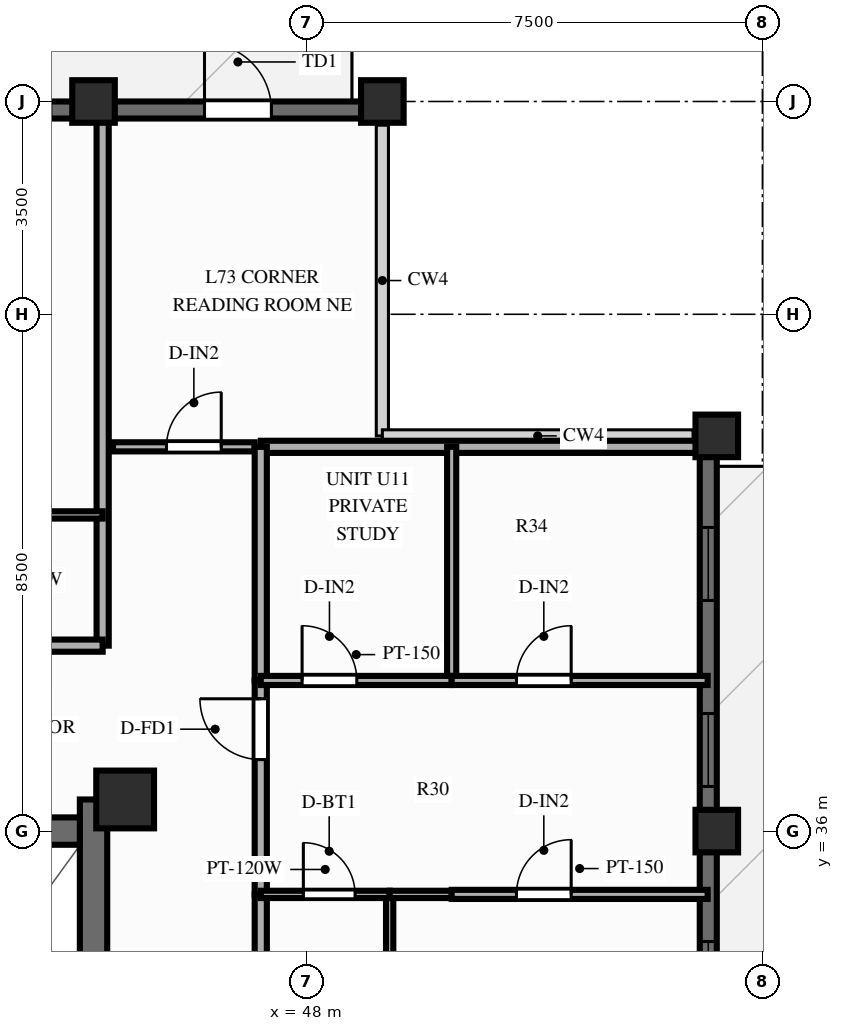
"""IFC4 building model, lengths in metres.
Left out: names, types, materials, properties, quantities, classifications, styles, units other than length and angle.
Written with IfcOpenShell. Run it as: python <this file> out.ifc"""

import sys

from ifc_helpers import new_model, si_unit, direction, frame, frame_2d, origin, origin_2d, place, context, subcontext, project, spatial, rectangle, extrude, source, transform, mapped, element, fill, save


model = new_model("IFC4")
c1 = context("Model", 3, precision=1e-05, world=origin(), true_north=direction((0.0, 1.0)))
c2 = subcontext(c1, "Body", "Model", "MODEL_VIEW")
j1 = project(units=[si_unit("LENGTHUNIT", "METRE"), si_unit("PLANEANGLEUNIT", "RADIAN")], contexts=[c1])
p1 = place(None, origin())
s1 = spatial("IfcSite", under=j1, at=p1, CompositionType="ELEMENT")
p2 = place(p1, origin())
s2 = spatial("IfcBuilding", under=s1, at=p2, CompositionType="ELEMENT")
p3 = place(p2, frame((0.0, 0.0, 236.1)))
s3 = spatial("IfcBuildingStorey", under=s2, at=p3, CompositionType="ELEMENT", Elevation=236.1)
p4 = place(p3, frame((44.5, 17.48, 0.0), z_axis=(0.0, 0.0, 1.0), x_axis=(0.0, 1.0, 0.0)))
e1 = element("IfcWall", 1, at=p4, inside=s3, PredefinedType="SHEAR", context=c2, shape_type="SweptSolid", body=[
    extrude(rectangle(XDim=19.04, YDim=0.45, at=frame_2d((9.52, 0.0))), origin(), (0.0, 0.0, 1.0), 3.9),
])
p5 = place(p4, frame((12.67, 0.0, 0.0), z_axis=(0.0, 0.0, 1.0), x_axis=(-1.0, 0.0, 0.0)))
e2 = element("IfcOpeningElement", 2, at=p5, cuts=e1, PredefinedType="OPENING", context=c2, shape_type="SweptSolid", body=[
    extrude(rectangle(XDim=1.1, YDim=2.15, at=frame_2d((0.55, 1.075))), frame((0.0, 0.237, 0.0), z_axis=(0.0, -1.0, 0.0), x_axis=(1.0, 0.0, 0.0)), (0.0, 0.0, 1.0), 0.474),
])
p6 = place(p3, frame((31.725, 36.0, 0.0), z_axis=(0.0, 0.0, 1.0), x_axis=(1.0, 0.0, 0.0)))
e3 = element("IfcWall", 3, at=p6, inside=s3, PredefinedType="SHEAR", context=c2, shape_type="SweptSolid", body=[
    extrude(rectangle(XDim=12.55, YDim=0.45, at=frame_2d((6.275, 0.0))), origin(), (0.0, 0.0, 1.0), 3.9),
])
p7 = place(p6, frame((5.225, 0.0, 0.0), z_axis=(0.0, 0.0, 1.0), x_axis=(-1.0, 0.0, 0.0)))
e4 = element("IfcOpeningElement", 4, at=p7, cuts=e3, PredefinedType="OPENING", context=c2, shape_type="SweptSolid", body=[
    extrude(rectangle(XDim=1.4, YDim=2.15, at=frame_2d((0.7, 1.075))), frame((0.0, 0.237, 0.0), z_axis=(0.0, -1.0, 0.0), x_axis=(1.0, 0.0, 0.0)), (0.0, 0.0, 1.0), 0.474),
])
m1 = source(origin(), c2, "Body", "SweptSolid", [
    extrude(rectangle(XDim=0.95, YDim=0.95, at=origin_2d()), origin(), (0.0, 0.0, 1.0), 3.9),
])
p8 = place(p3, frame((45.02, 36.52, 0.0), z_axis=(0.0, 0.0, 1.0), x_axis=(1.0, 0.0, 0.0)))
e5 = element("IfcColumn", 5, at=p8, inside=s3, PredefinedType="COLUMN", context=c2, shape_type="MappedRepresentation", body=[
    mapped(m1, transform((0.0, 0.0, 0.0), scale=1.0)),
])
m2 = source(origin(), c2, "Body", "SweptSolid", [
    extrude(rectangle(XDim=0.7, YDim=0.7, at=origin_2d()), origin(), (0.0, 0.0, 1.0), 3.9),
])
for number, where, z_axis, x_axis in (
    (6, (54.75, 36.0, 0.0), (0.0, 0.0, 1.0), (1.0, 0.0, 0.0)),
    (7, (54.75, 42.5, 0.0), (0.0, 0.0, 1.0), (1.0, 0.0, 0.0)),
    (8, (49.25, 48.0, 0.0), (0.0, 0.0, 1.0), (1.0, 0.0, 0.0)),
    (9, (44.5, 48.0, 0.0), (0.0, 0.0, 1.0), (1.0, 0.0, 0.0)),
):
    element("IfcColumn", number, at=place(p3, frame(where, z_axis=z_axis, x_axis=x_axis)), inside=s3, PredefinedType="COLUMN", context=c2, shape_type="MappedRepresentation", body=[
        mapped(m2, transform((0.0, 0.0, 0.0), scale=1.0)),
    ])
p9 = place(p3, frame((26.75, 47.86, 0.0), z_axis=(0.0, 0.0, 1.0), x_axis=(1.0, 0.0, 0.0)))
e10 = element("IfcWall", 10, at=p9, inside=s3, PredefinedType="SOLIDWALL", context=c2, shape_type="SweptSolid", body=[
    extrude(rectangle(XDim=22.5, YDim=0.28, at=frame_2d((11.25, 0.0))), origin(), (0.0, 0.0, 1.0), 2.44),
])
p10 = place(p9, frame((1.775, 0.0, 0.25)))
e11 = element("IfcOpeningElement", 11, at=p10, cuts=e10, PredefinedType="OPENING", context=c2, shape_type="SweptSolid", body=[
    extrude(rectangle(XDim=1.2, YDim=1.5, at=frame_2d((0.6, 0.75))), frame((0.0, 0.152, 0.0), z_axis=(0.0, -1.0, 0.0), x_axis=(1.0, 0.0, 0.0)), (0.0, 0.0, 1.0), 0.304),
])
p11 = place(p9, frame((5.37, 0.0, 0.25)))
e12 = element("IfcOpeningElement", 12, at=p11, cuts=e10, PredefinedType="OPENING", context=c2, shape_type="SweptSolid", body=[
    extrude(rectangle(XDim=0.95, YDim=1.5, at=frame_2d((0.475, 0.75))), frame((0.0, 0.152, 0.0), z_axis=(0.0, -1.0, 0.0), x_axis=(1.0, 0.0, 0.0)), (0.0, 0.0, 1.0), 0.304),
])
p12 = place(p9, frame((7.432, 0.0, 0.25)))
e13 = element("IfcOpeningElement", 13, at=p12, cuts=e10, PredefinedType="OPENING", context=c2, shape_type="SweptSolid", body=[
    extrude(rectangle(XDim=1.2, YDim=1.5, at=frame_2d((0.6, 0.75))), frame((0.0, 0.152, 0.0), z_axis=(0.0, -1.0, 0.0), x_axis=(1.0, 0.0, 0.0)), (0.0, 0.0, 1.0), 0.304),
])
p13 = place(p9, frame((10.22, 0.0, 0.25)))
e14 = element("IfcOpeningElement", 14, at=p13, cuts=e10, PredefinedType="OPENING", context=c2, shape_type="SweptSolid", body=[
    extrude(rectangle(XDim=1.2, YDim=1.5, at=frame_2d((0.6, 0.75))), frame((0.0, 0.152, 0.0), z_axis=(0.0, -1.0, 0.0), x_axis=(1.0, 0.0, 0.0)), (0.0, 0.0, 1.0), 0.304),
])
p14 = place(p9, frame((13.23, 0.0, 0.25)))
e15 = element("IfcOpeningElement", 15, at=p14, cuts=e10, PredefinedType="OPENING", context=c2, shape_type="SweptSolid", body=[
    extrude(rectangle(XDim=1.2, YDim=1.5, at=frame_2d((0.6, 0.75))), frame((0.0, 0.152, 0.0), z_axis=(0.0, -1.0, 0.0), x_axis=(1.0, 0.0, 0.0)), (0.0, 0.0, 1.0), 0.304),
])
p15 = place(p9, frame((15.848, 0.0, 0.25)))
e16 = element("IfcOpeningElement", 16, at=p15, cuts=e10, PredefinedType="OPENING", context=c2, shape_type="SweptSolid", body=[
    extrude(rectangle(XDim=1.2, YDim=1.5, at=frame_2d((0.6, 0.75))), frame((0.0, 0.152, 0.0), z_axis=(0.0, -1.0, 0.0), x_axis=(1.0, 0.0, 0.0)), (0.0, 0.0, 1.0), 0.304),
])
p16 = place(p9, frame((19.575, 0.0, 0.0)))
e17 = element("IfcOpeningElement", 17, at=p16, cuts=e10, PredefinedType="OPENING", context=c2, shape_type="SweptSolid", body=[
    extrude(rectangle(XDim=1.1, YDim=2.15, at=frame_2d((0.55, 1.075))), frame((0.0, 0.152, 0.0), z_axis=(0.0, -1.0, 0.0), x_axis=(1.0, 0.0, 0.0)), (0.0, 0.0, 1.0), 0.304),
])
p17 = place(p3, frame((54.61, 11.5, 0.0), z_axis=(0.0, 0.0, 1.0), x_axis=(0.0, 1.0, 0.0)))
e18 = element("IfcWall", 18, at=p17, inside=s3, PredefinedType="SOLIDWALL", context=c2, shape_type="SweptSolid", body=[
    extrude(rectangle(XDim=31.0, YDim=0.28, at=frame_2d((15.5, 0.0))), origin(), (0.0, 0.0, 1.0), 2.44),
])
p18 = place(p17, frame((0.96, 0.0, 0.25)))
e19 = element("IfcOpeningElement", 19, at=p18, cuts=e18, PredefinedType="OPENING", context=c2, shape_type="SweptSolid", body=[
    extrude(rectangle(XDim=1.2, YDim=1.5, at=frame_2d((0.6, 0.75))), frame((0.0, 0.152, 0.0), z_axis=(0.0, -1.0, 0.0), x_axis=(1.0, 0.0, 0.0)), (0.0, 0.0, 1.0), 0.304),
])
p19 = place(p17, frame((4.02, 0.0, 0.25)))
e20 = element("IfcOpeningElement", 20, at=p19, cuts=e18, PredefinedType="OPENING", context=c2, shape_type="SweptSolid", body=[
    extrude(rectangle(XDim=1.2, YDim=1.5, at=frame_2d((0.6, 0.75))), frame((0.0, 0.152, 0.0), z_axis=(0.0, -1.0, 0.0), x_axis=(1.0, 0.0, 0.0)), (0.0, 0.0, 1.0), 0.304),
])
p20 = place(p17, frame((8.089, 0.0, 0.25)))
e21 = element("IfcOpeningElement", 21, at=p20, cuts=e18, PredefinedType="OPENING", context=c2, shape_type="SweptSolid", body=[
    extrude(rectangle(XDim=1.2, YDim=1.5, at=frame_2d((0.6, 0.75))), frame((0.0, 0.152, 0.0), z_axis=(0.0, -1.0, 0.0), x_axis=(1.0, 0.0, 0.0)), (0.0, 0.0, 1.0), 0.304),
])
p21 = place(p17, frame((11.373, 0.0, 0.25)))
e22 = element("IfcOpeningElement", 22, at=p21, cuts=e18, PredefinedType="OPENING", context=c2, shape_type="SweptSolid", body=[
    extrude(rectangle(XDim=1.2, YDim=1.5, at=frame_2d((0.6, 0.75))), frame((0.0, 0.152, 0.0), z_axis=(0.0, -1.0, 0.0), x_axis=(1.0, 0.0, 0.0)), (0.0, 0.0, 1.0), 0.304),
])
p22 = place(p17, frame((15.907, 0.0, 0.0), z_axis=(0.0, 0.0, 1.0), x_axis=(-1.0, 0.0, 0.0)))
e23 = element("IfcOpeningElement", 23, at=p22, cuts=e18, PredefinedType="OPENING", context=c2, shape_type="SweptSolid", body=[
    extrude(rectangle(XDim=1.6, YDim=2.15, at=frame_2d((0.8, 1.075))), frame((0.0, 0.152, 0.0), z_axis=(0.0, -1.0, 0.0), x_axis=(1.0, 0.0, 0.0)), (0.0, 0.0, 1.0), 0.304),
])
p23 = place(p17, frame((18.188, 0.0, 0.25)))
e24 = element("IfcOpeningElement", 24, at=p23, cuts=e18, PredefinedType="OPENING", context=c2, shape_type="SweptSolid", body=[
    extrude(rectangle(XDim=1.2, YDim=1.5, at=frame_2d((0.6, 0.75))), frame((0.0, 0.152, 0.0), z_axis=(0.0, -1.0, 0.0), x_axis=(1.0, 0.0, 0.0)), (0.0, 0.0, 1.0), 0.304),
])
p24 = place(p17, frame((21.484, 0.0, 0.25)))
e25 = element("IfcOpeningElement", 25, at=p24, cuts=e18, PredefinedType="OPENING", context=c2, shape_type="SweptSolid", body=[
    extrude(rectangle(XDim=1.2, YDim=1.5, at=frame_2d((0.6, 0.75))), frame((0.0, 0.152, 0.0), z_axis=(0.0, -1.0, 0.0), x_axis=(1.0, 0.0, 0.0)), (0.0, 0.0, 1.0), 0.304),
])
p25 = place(p17, frame((25.234, 0.0, 0.25)))
e26 = element("IfcOpeningElement", 26, at=p25, cuts=e18, PredefinedType="OPENING", context=c2, shape_type="SweptSolid", body=[
    extrude(rectangle(XDim=1.2, YDim=1.5, at=frame_2d((0.6, 0.75))), frame((0.0, 0.152, 0.0), z_axis=(0.0, -1.0, 0.0), x_axis=(1.0, 0.0, 0.0)), (0.0, 0.0, 1.0), 0.304),
])
p26 = place(p17, frame((28.294, 0.0, 0.25)))
e27 = element("IfcOpeningElement", 27, at=p26, cuts=e18, PredefinedType="OPENING", context=c2, shape_type="SweptSolid", body=[
    extrude(rectangle(XDim=1.2, YDim=1.5, at=frame_2d((0.6, 0.75))), frame((0.0, 0.152, 0.0), z_axis=(0.0, -1.0, 0.0), x_axis=(1.0, 0.0, 0.0)), (0.0, 0.0, 1.0), 0.304),
])
p27 = place(p3, frame((44.82, 42.32, 0.0), z_axis=(0.0, 0.0, 1.0), x_axis=(1.0, 0.0, 0.0)))
e28 = element("IfcWall", 28, at=p27, inside=s3, PredefinedType="PARTITIONING", context=c2, shape_type="SweptSolid", body=[
    extrude(rectangle(XDim=2.33, YDim=0.15, at=frame_2d((1.165, 0.0))), origin(), (0.0, 0.0, 1.0), 2.24),
])
p28 = place(p27, frame((0.88, 0.0, 0.0)))
e29 = element("IfcOpeningElement", 29, at=p28, cuts=e28, PredefinedType="OPENING", context=c2, shape_type="SweptSolid", body=[
    extrude(rectangle(XDim=0.9, YDim=2.1, at=frame_2d((0.45, 1.05))), frame((0.0, 0.087, 0.0), z_axis=(0.0, -1.0, 0.0), x_axis=(1.0, 0.0, 0.0)), (0.0, 0.0, 1.0), 0.174),
])
p29 = place(p3, frame((44.65, 39.05, 0.0), z_axis=(0.0, 0.0, 1.0), x_axis=(0.0, 1.0, 0.0)))
e30 = element("IfcWall", 30, at=p29, inside=s3, PredefinedType="PARTITIONING", context=c2, shape_type="SweptSolid", body=[
    extrude(rectangle(XDim=8.8, YDim=0.2, at=frame_2d((4.4, 0.0))), origin(), (0.0, 0.0, 1.0), 2.44),
])
p30 = place(p3, frame((42.085, 39.05, 0.0), z_axis=(0.0, 0.0, 1.0), x_axis=(1.0, 0.0, 0.0)))
e31 = element("IfcWall", 31, at=p30, inside=s3, PredefinedType="PARTITIONING", context=c2, shape_type="SweptSolid", body=[
    extrude(rectangle(XDim=2.564, YDim=0.2, at=frame_2d((1.282, 0.0))), origin(), (0.0, 0.0, 1.0), 3.56),
])
p31 = place(p3, frame((42.085, 41.2, 0.0), z_axis=(0.0, 0.0, 1.0), x_axis=(1.0, 0.0, 0.0)))
e32 = element("IfcWall", 32, at=p31, inside=s3, PredefinedType="PARTITIONING", context=c2, shape_type="SweptSolid", body=[
    extrude(rectangle(XDim=2.564, YDim=0.12, at=frame_2d((1.282, 0.0))), origin(), (0.0, 0.0, 1.0), 3.56),
])
p32 = place(p3, frame((47.25, 42.32, 0.0), z_axis=(0.0, 0.0, 1.0), x_axis=(1.0, 0.0, 0.0)))
e33 = element("IfcWall", 33, at=p32, inside=s3, PredefinedType="PARTITIONING", context=c2, shape_type="SweptSolid", body=[
    extrude(rectangle(XDim=7.35, YDim=0.2, at=frame_2d((3.675, 0.0))), origin(), (0.0, 0.0, 1.0), 2.24),
])
p33 = place(p3, frame((47.25, 32.209, 0.0), z_axis=(0.0, 0.0, 1.0), x_axis=(0.0, 1.0, 0.0)))
e34 = element("IfcWall", 34, at=p33, inside=s3, PredefinedType="PARTITIONING", context=c2, shape_type="SweptSolid", body=[
    extrude(rectangle(XDim=2.75, YDim=0.2, at=frame_2d((1.375, 0.0))), origin(), (0.0, 0.0, 1.0), 3.56),
])
p34 = place(p3, frame((47.25, 34.959, 0.0), z_axis=(0.0, 0.0, 1.0), x_axis=(0.0, 1.0, 0.0)))
e35 = element("IfcWall", 35, at=p34, inside=s3, PredefinedType="PARTITIONING", context=c2, shape_type="SweptSolid", body=[
    extrude(rectangle(XDim=3.519, YDim=0.2, at=frame_2d((1.76, 0.0))), origin(), (0.0, 0.0, 1.0), 2.24),
])
p35 = place(p34, frame((2.217, 0.0, 0.0)))
e36 = element("IfcOpeningElement", 36, at=p35, cuts=e35, PredefinedType="OPENING", context=c2, shape_type="SweptSolid", body=[
    extrude(rectangle(XDim=1.0, YDim=2.15, at=frame_2d((0.5, 1.075))), frame((0.0, 0.112, 0.0), z_axis=(0.0, -1.0, 0.0), x_axis=(1.0, 0.0, 0.0)), (0.0, 0.0, 1.0), 0.224),
])
p36 = place(p3, frame((47.25, 38.478, 0.0), z_axis=(0.0, 0.0, 1.0), x_axis=(0.0, 1.0, 0.0)))
e37 = element("IfcWall", 37, at=p36, inside=s3, PredefinedType="PARTITIONING", context=c2, shape_type="SweptSolid", body=[
    extrude(rectangle(XDim=3.842, YDim=0.2, at=frame_2d((1.921, 0.0))), origin(), (0.0, 0.0, 1.0), 2.24),
])
p37 = place(p3, frame((49.37, 32.209, 0.0), z_axis=(0.0, 0.0, 1.0), x_axis=(0.0, 1.0, 0.0)))
e38 = element("IfcWall", 38, at=p37, inside=s3, PredefinedType="PARTITIONING", context=c2, shape_type="SweptSolid", body=[
    extrude(rectangle(XDim=2.75, YDim=0.12, at=frame_2d((1.375, 0.0))), origin(), (0.0, 0.0, 1.0), 3.39),
])
p38 = place(p3, frame((50.39, 38.478, 0.0), z_axis=(0.0, 0.0, 1.0), x_axis=(0.0, 1.0, 0.0)))
e39 = element("IfcWall", 39, at=p38, inside=s3, PredefinedType="PARTITIONING", context=c2, shape_type="SweptSolid", body=[
    extrude(rectangle(XDim=3.842, YDim=0.15, at=frame_2d((1.921, 0.0))), origin(), (0.0, 0.0, 1.0), 3.56),
])
p39 = place(p3, frame((47.25, 34.959, 0.0), z_axis=(0.0, 0.0, 1.0), x_axis=(1.0, 0.0, 0.0)))
e40 = element("IfcWall", 40, at=p39, inside=s3, PredefinedType="PARTITIONING", context=c2, shape_type="SweptSolid", body=[
    extrude(rectangle(XDim=2.12, YDim=0.12, at=frame_2d((1.06, 0.0))), origin(), (0.0, 0.0, 1.0), 3.56),
])
p40 = place(p39, frame((0.701, 0.0, 0.0)))
e41 = element("IfcOpeningElement", 41, at=p40, cuts=e40, PredefinedType="OPENING", context=c2, shape_type="SweptSolid", body=[
    extrude(rectangle(XDim=0.85, YDim=2.05, at=frame_2d((0.425, 1.025))), frame((0.0, 0.072, 0.0), z_axis=(0.0, -1.0, 0.0), x_axis=(1.0, 0.0, 0.0)), (0.0, 0.0, 1.0), 0.144),
])
p41 = place(p3, frame((49.37, 34.959, 0.0), z_axis=(0.0, 0.0, 1.0), x_axis=(1.0, 0.0, 0.0)))
e42 = element("IfcWall", 42, at=p41, inside=s3, PredefinedType="PARTITIONING", context=c2, shape_type="SweptSolid", body=[
    extrude(rectangle(XDim=1.02, YDim=0.12, at=frame_2d((0.51, 0.0))), origin(), (0.0, 0.0, 1.0), 3.56),
])
p42 = place(p3, frame((50.39, 34.959, 0.0), z_axis=(0.0, 0.0, 1.0), x_axis=(1.0, 0.0, 0.0)))
e43 = element("IfcWall", 43, at=p42, inside=s3, PredefinedType="PARTITIONING", context=c2, shape_type="SweptSolid", body=[
    extrude(rectangle(XDim=4.21, YDim=0.15, at=frame_2d((2.105, 0.0))), origin(), (0.0, 0.0, 1.0), 3.56),
])
p43 = place(p42, frame((1.065, 0.0, 0.0)))
e44 = element("IfcOpeningElement", 44, at=p43, cuts=e43, PredefinedType="OPENING", context=c2, shape_type="SweptSolid", body=[
    extrude(rectangle(XDim=0.9, YDim=2.1, at=frame_2d((0.45, 1.05))), frame((0.0, 0.087, 0.0), z_axis=(0.0, -1.0, 0.0), x_axis=(1.0, 0.0, 0.0)), (0.0, 0.0, 1.0), 0.174),
])
p44 = place(p3, frame((47.25, 38.478, 0.0), z_axis=(0.0, 0.0, 1.0), x_axis=(1.0, 0.0, 0.0)))
e45 = element("IfcWall", 45, at=p44, inside=s3, PredefinedType="PARTITIONING", context=c2, shape_type="SweptSolid", body=[
    extrude(rectangle(XDim=3.14, YDim=0.15, at=frame_2d((1.57, 0.0))), origin(), (0.0, 0.0, 1.0), 3.56),
])
p45 = place(p44, frame((0.68, 0.0, 0.0)))
e46 = element("IfcOpeningElement", 46, at=p45, cuts=e45, PredefinedType="OPENING", context=c2, shape_type="SweptSolid", body=[
    extrude(rectangle(XDim=0.9, YDim=2.1, at=frame_2d((0.45, 1.05))), frame((0.0, 0.087, 0.0), z_axis=(0.0, -1.0, 0.0), x_axis=(1.0, 0.0, 0.0)), (0.0, 0.0, 1.0), 0.174),
])
p46 = place(p3, frame((50.39, 38.478, 0.0), z_axis=(0.0, 0.0, 1.0), x_axis=(1.0, 0.0, 0.0)))
e47 = element("IfcWall", 47, at=p46, inside=s3, PredefinedType="PARTITIONING", context=c2, shape_type="SweptSolid", body=[
    extrude(rectangle(XDim=4.21, YDim=0.15, at=frame_2d((2.105, 0.0))), origin(), (0.0, 0.0, 1.0), 3.56),
])
p47 = place(p46, frame((1.065, 0.0, 0.0)))
e48 = element("IfcOpeningElement", 48, at=p47, cuts=e47, PredefinedType="OPENING", context=c2, shape_type="SweptSolid", body=[
    extrude(rectangle(XDim=0.9, YDim=2.1, at=frame_2d((0.45, 1.05))), frame((0.0, 0.087, 0.0), z_axis=(0.0, -1.0, 0.0), x_axis=(1.0, 0.0, 0.0)), (0.0, 0.0, 1.0), 0.174),
])
m3 = source(origin(), c2, "Body", "SweptSolid", [
    extrude(rectangle(XDim=1.1, YDim=2.15, at=frame_2d((0.55, 1.075))), frame((0.0, 0.025, 0.0), z_axis=(0.0, -1.0, 0.0), x_axis=(1.0, 0.0, 0.0)), (0.0, 0.0, 1.0), 0.05),
])
p48 = place(p16, origin())
e49 = element("IfcDoor", 49, at=p48, inside=s3, OperationType="SINGLE_SWING_LEFT", PredefinedType="DOOR", context=c2, shape_type="MappedRepresentation", body=[
    mapped(m3, transform((0.0, 0.0, 0.0), scale=1.0)),
])
fill(e17, e49)
m4 = source(origin(), c2, "Body", "SweptSolid", [
    extrude(rectangle(XDim=1.2, YDim=1.5, at=frame_2d((0.6, 0.75))), frame((0.0, 0.03, 0.0), z_axis=(0.0, -1.0, 0.0), x_axis=(1.0, 0.0, 0.0)), (0.0, 0.0, 1.0), 0.06),
])
p49 = place(p24, origin())
e50 = element("IfcWindow", 50, at=p49, inside=s3, PartitioningType="SINGLE_PANEL", PredefinedType="WINDOW", context=c2, shape_type="MappedRepresentation", body=[
    mapped(m4, transform((0.0, 0.0, 0.0), scale=1.0)),
])
fill(e25, e50)
p50 = place(p25, origin())
e51 = element("IfcWindow", 51, at=p50, inside=s3, PartitioningType="SINGLE_PANEL", PredefinedType="WINDOW", context=c2, shape_type="MappedRepresentation", body=[
    mapped(m4, transform((0.0, 0.0, 0.0), scale=1.0)),
])
fill(e26, e51)
p51 = place(p26, origin())
e52 = element("IfcWindow", 52, at=p51, inside=s3, PartitioningType="SINGLE_PANEL", PredefinedType="WINDOW", context=c2, shape_type="MappedRepresentation", body=[
    mapped(m4, transform((0.0, 0.0, 0.0), scale=1.0)),
])
fill(e27, e52)
m5 = source(origin(), c2, "Body", "SweptSolid", [
    extrude(rectangle(XDim=0.9, YDim=2.1, at=frame_2d((0.45, 1.05))), frame((0.0, 0.025, 0.0), z_axis=(0.0, -1.0, 0.0), x_axis=(1.0, 0.0, 0.0)), (0.0, 0.0, 1.0), 0.05),
])
p52 = place(p28, origin())
e53 = element("IfcDoor", 53, at=p52, inside=s3, OperationType="SINGLE_SWING_RIGHT", PredefinedType="DOOR", context=c2, shape_type="MappedRepresentation", body=[
    mapped(m5, transform((0.0, 0.0, 0.0), scale=1.0)),
])
fill(e29, e53)
m6 = source(origin(), c2, "Body", "SweptSolid", [
    extrude(rectangle(XDim=1.0, YDim=2.15, at=frame_2d((0.5, 1.075))), frame((0.0, 0.025, 0.0), z_axis=(0.0, -1.0, 0.0), x_axis=(1.0, 0.0, 0.0)), (0.0, 0.0, 1.0), 0.05),
])
p53 = place(p35, origin())
e54 = element("IfcDoor", 54, at=p53, inside=s3, OperationType="SINGLE_SWING_RIGHT", PredefinedType="DOOR", context=c2, shape_type="MappedRepresentation", body=[
    mapped(m6, transform((0.0, 0.0, 0.0), scale=1.0)),
])
fill(e36, e54)
m7 = source(origin(), c2, "Body", "SweptSolid", [
    extrude(rectangle(XDim=0.85, YDim=2.05, at=frame_2d((0.425, 1.025))), frame((0.0, 0.025, 0.0), z_axis=(0.0, -1.0, 0.0), x_axis=(1.0, 0.0, 0.0)), (0.0, 0.0, 1.0), 0.05),
])
p54 = place(p40, origin())
e55 = element("IfcDoor", 55, at=p54, inside=s3, OperationType="SINGLE_SWING_LEFT", PredefinedType="DOOR", context=c2, shape_type="MappedRepresentation", body=[
    mapped(m7, transform((0.0, 0.0, 0.0), scale=1.0)),
])
fill(e41, e55)
p55 = place(p43, origin())
e56 = element("IfcDoor", 56, at=p55, inside=s3, OperationType="SINGLE_SWING_RIGHT", PredefinedType="DOOR", context=c2, shape_type="MappedRepresentation", body=[
    mapped(m5, transform((0.0, 0.0, 0.0), scale=1.0)),
])
fill(e44, e56)
p56 = place(p45, origin())
e57 = element("IfcDoor", 57, at=p56, inside=s3, OperationType="SINGLE_SWING_LEFT", PredefinedType="DOOR", context=c2, shape_type="MappedRepresentation", body=[
    mapped(m5, transform((0.0, 0.0, 0.0), scale=1.0)),
])
fill(e46, e57)
p57 = place(p47, origin())
e58 = element("IfcDoor", 58, at=p57, inside=s3, OperationType="SINGLE_SWING_RIGHT", PredefinedType="DOOR", context=c2, shape_type="MappedRepresentation", body=[
    mapped(m5, transform((0.0, 0.0, 0.0), scale=1.0)),
])
fill(e48, e58)
save(model, sys.argv[1])
